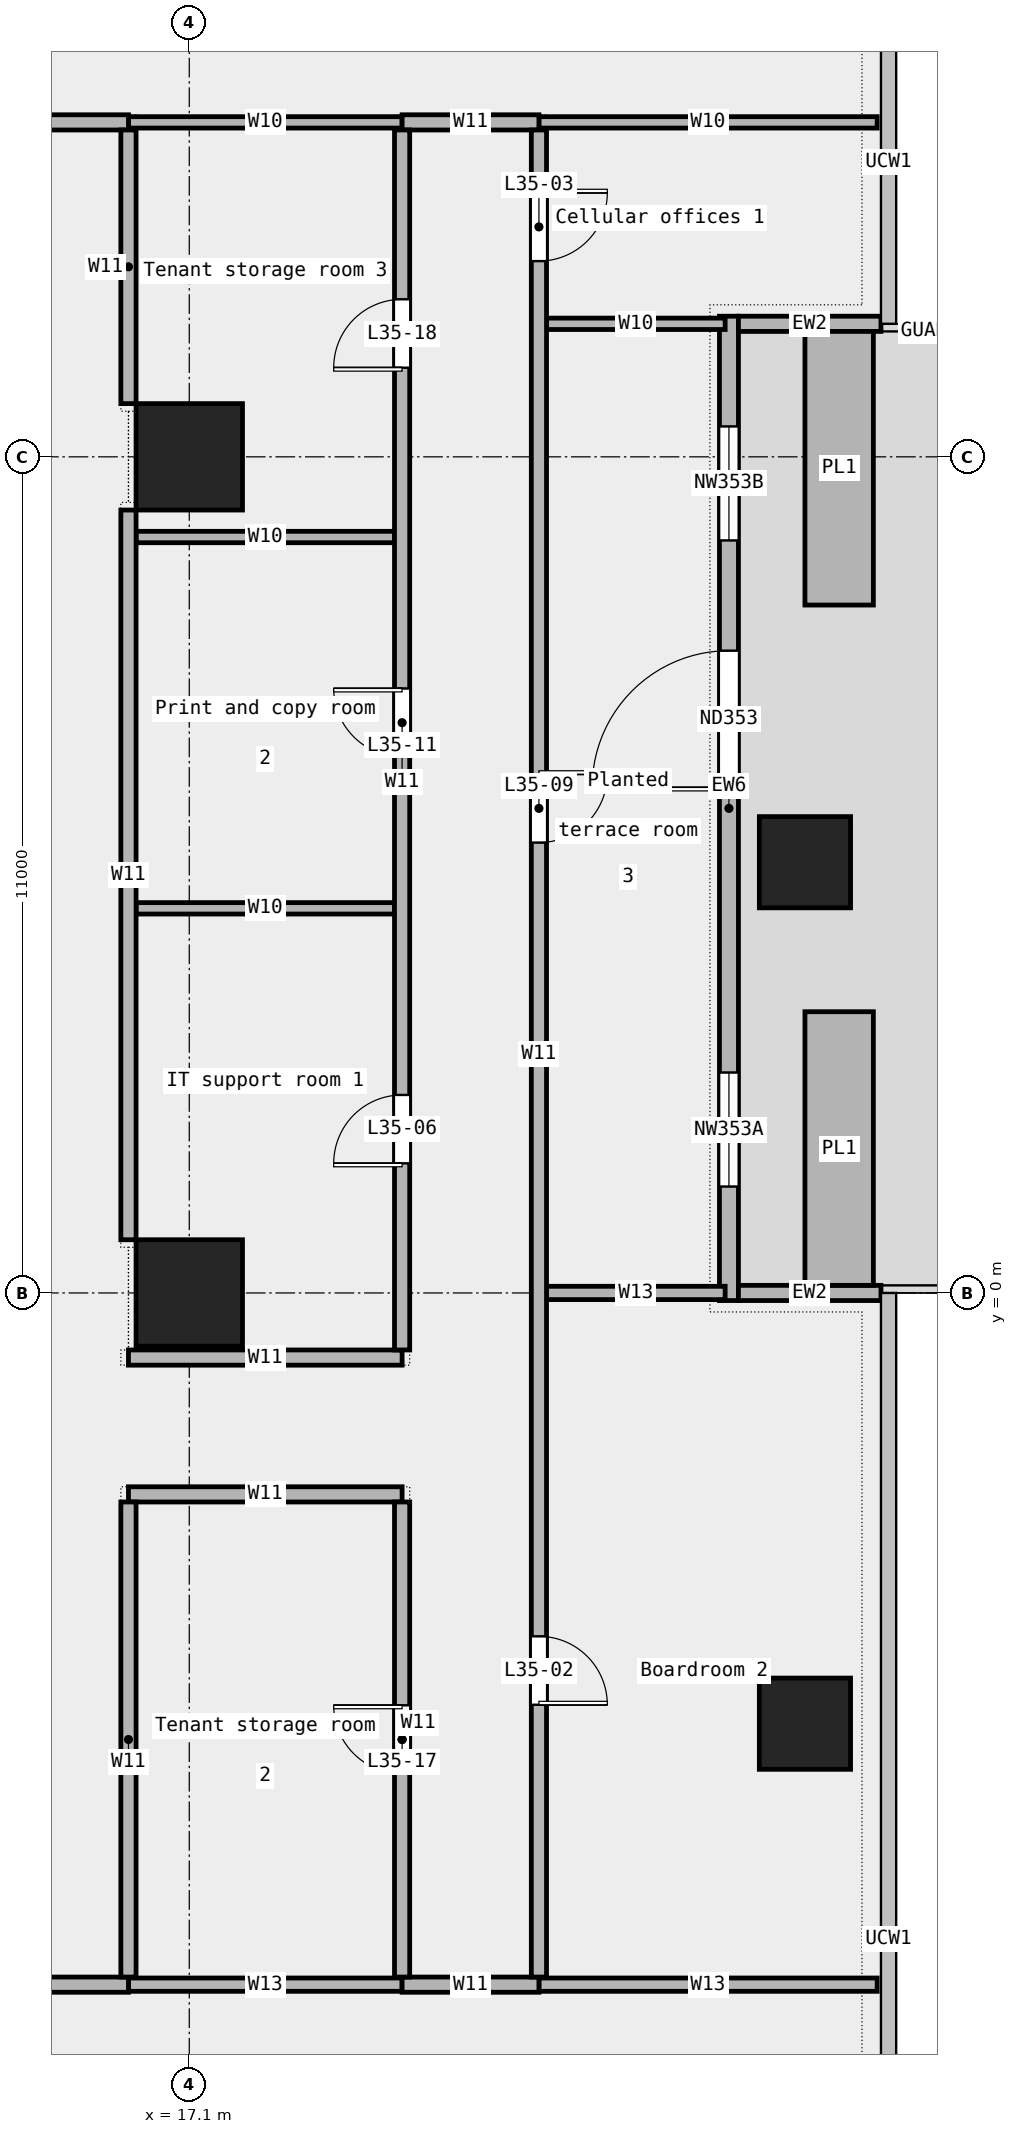
"""IFC4 building model, lengths in metres.
Left out: names, types, materials, properties, quantities, classifications, styles, units other than length and angle.
Written with IfcOpenShell. Run it as: python <this file> out.ifc"""

import sys

from ifc_helpers import new_model, si_unit, direction, frame, frame_2d, origin, origin_2d, place, context, subcontext, project, spatial, rectangle, extrude, element, fill, save


model = new_model("IFC4")
c1 = context("Model", 3, precision=1e-05, world=origin(), true_north=direction((0.0, 1.0)))
c2 = subcontext(c1, "Body", "Model", "MODEL_VIEW")
j1 = project(units=[si_unit("LENGTHUNIT", "METRE"), si_unit("PLANEANGLEUNIT", "RADIAN")], contexts=[c1])
p1 = place(None, origin())
s1 = spatial("IfcSite", under=j1, at=p1, CompositionType="ELEMENT")
p2 = place(p1, origin())
s2 = spatial("IfcBuilding", under=s1, at=p2, CompositionType="ELEMENT")
p3 = place(p2, frame((0.0, 0.0, 173.0)))
s3 = spatial("IfcBuildingStorey", under=s2, at=p3, CompositionType="ELEMENT", Elevation=173.0)
for number, where, z_axis, x_axis in (
    (1, (25.2, -5.667, 0.0), (0.0, 0.0, 1.0), (1.0, 0.0, 0.0)),
    (2, (25.2, 5.667, 0.0), (0.0, 0.0, 1.0), (1.0, 0.0, 0.0)),
):
    element("IfcColumn", number, at=place(p3, frame(where, z_axis=z_axis, x_axis=x_axis)), inside=s3, PredefinedType="COLUMN", context=c2, shape_type="SweptSolid", body=[
        extrude(rectangle(XDim=1.2, YDim=1.2, at=origin_2d()), origin(), (0.0, 0.0, 1.0), 3.6),
    ])
for number, where, z_axis, x_axis in (
    (3, (17.1, 0.0, 0.0), (0.0, 0.0, 1.0), (1.0, 0.0, 0.0)),
    (4, (17.1, 11.0, 0.0), (0.0, 0.0, 1.0), (1.0, 0.0, 0.0)),
):
    element("IfcColumn", number, at=place(p3, frame(where, z_axis=z_axis, x_axis=x_axis)), inside=s3, PredefinedType="COLUMN", context=c2, shape_type="SweptSolid", body=[
        extrude(rectangle(XDim=1.4, YDim=1.4, at=origin_2d()), origin(), (0.0, 0.0, 1.0), 3.6),
    ])
p4 = place(p3, frame((24.2, -0.1, 0.0), z_axis=(0.0, 0.0, 1.0), x_axis=(0.0, 1.0, 0.0)))
e5 = element("IfcWall", 5, at=p4, inside=s3, PredefinedType="STANDARD", context=c2, shape_type="SweptSolid", body=[
    extrude(rectangle(XDim=12.95, YDim=0.25, at=frame_2d((6.475, 0.0))), origin(), (0.0, 0.0, 1.0), 3.6),
])
p5 = place(p4, frame((1.5, 0.0, 0.45)))
e6 = element("IfcOpeningElement", 6, at=p5, cuts=e5, PredefinedType="OPENING", context=c2, shape_type="SweptSolid", body=[
    extrude(rectangle(XDim=1.5, YDim=2.4, at=frame_2d((0.75, 1.2))), frame((0.0, 0.137, 0.0), z_axis=(0.0, -1.0, 0.0), x_axis=(1.0, 0.0, 0.0)), (0.0, 0.0, 1.0), 0.274),
])
p6 = place(p4, frame((6.75, 0.0, 0.0)))
e7 = element("IfcOpeningElement", 7, at=p6, cuts=e5, PredefinedType="OPENING", context=c2, shape_type="SweptSolid", body=[
    extrude(rectangle(XDim=1.8, YDim=2.4, at=frame_2d((0.9, 1.2))), frame((0.0, 0.137, 0.0), z_axis=(0.0, -1.0, 0.0), x_axis=(1.0, 0.0, 0.0)), (0.0, 0.0, 1.0), 0.274),
])
p7 = place(p4, frame((10.0, 0.0, 0.45)))
e8 = element("IfcOpeningElement", 8, at=p7, cuts=e5, PredefinedType="OPENING", context=c2, shape_type="SweptSolid", body=[
    extrude(rectangle(XDim=1.5, YDim=2.4, at=frame_2d((0.75, 1.2))), frame((0.0, 0.137, 0.0), z_axis=(0.0, -1.0, 0.0), x_axis=(1.0, 0.0, 0.0)), (0.0, 0.0, 1.0), 0.274),
])
for number, where, z_axis, x_axis in (
    (9, (26.2, 0.0, 0.0), (0.0, 0.0, 1.0), (-1.0, 0.0, 0.0)),
    (10, (26.2, 12.75, 0.0), (0.0, 0.0, 1.0), (-1.0, 0.0, 0.0)),
):
    element("IfcWall", number, at=place(p3, frame(where, z_axis=z_axis, x_axis=x_axis)), inside=s3, PredefinedType="STANDARD", context=c2, shape_type="SweptSolid", body=[
        extrude(rectangle(XDim=1.875, YDim=0.2, at=frame_2d((0.938, 0.0))), origin(), (0.0, 0.0, 1.0), 3.6),
    ])
for number, where, z_axis, x_axis in (
    (11, (25.65, 0.1, 0.0), (0.0, 0.0, 1.0), (0.0, 1.0, 0.0)),
    (12, (25.65, 9.05, 0.0), (0.0, 0.0, 1.0), (0.0, 1.0, 0.0)),
):
    element("IfcWall", number, at=place(p3, frame(where, z_axis=z_axis, x_axis=x_axis)), inside=s3, PredefinedType="STANDARD", context=c2, shape_type="SweptSolid", body=[
        extrude(rectangle(XDim=3.6, YDim=0.9, at=frame_2d((1.8, 0.0))), origin(), (0.0, 0.0, 1.0), 0.7),
    ])
p8 = place(p3, frame((16.3, -9.1, 0.0), z_axis=(0.0, 0.0, 1.0), x_axis=(1.0, 0.0, 0.0)))
e13 = element("IfcWall", 13, at=p8, inside=s3, PredefinedType="PARTITIONING", context=c2, shape_type="SweptSolid", body=[
    extrude(rectangle(XDim=3.6, YDim=0.175, at=frame_2d((1.8, 0.0))), origin(), (0.0, 0.0, 1.0), 3.6),
])
p9 = place(p3, frame((21.7, -9.1, 0.0), z_axis=(0.0, 0.0, 1.0), x_axis=(1.0, 0.0, 0.0)))
e14 = element("IfcWall", 14, at=p9, inside=s3, PredefinedType="PARTITIONING", context=c2, shape_type="SweptSolid", body=[
    extrude(rectangle(XDim=4.45, YDim=0.175, at=frame_2d((2.225, 0.0))), origin(), (0.0, 0.0, 1.0), 3.6),
])
p10 = place(p3, frame((-3.04, -9.1, 0.0), z_axis=(0.0, 0.0, 1.0), x_axis=(1.0, 0.0, 0.0)))
e15 = element("IfcWall", 15, at=p10, inside=s3, PredefinedType="PARTITIONING", context=c2, shape_type="SweptSolid", body=[
    extrude(rectangle(XDim=19.34, YDim=0.2, at=frame_2d((9.67, 0.0))), origin(), (0.0, 0.0, 1.0), 3.6),
])
p11 = place(p10, frame((5.942, 0.0, 0.0)))
e16 = element("IfcOpeningElement", 16, at=p11, cuts=e15, PredefinedType="OPENING", context=c2, shape_type="SweptSolid", body=[
    extrude(rectangle(XDim=1.0, YDim=2.1, at=frame_2d((0.5, 1.05))), frame((0.0, 0.112, 0.0), z_axis=(0.0, -1.0, 0.0), x_axis=(1.0, 0.0, 0.0)), (0.0, 0.0, 1.0), 0.224),
])
p12 = place(p3, frame((19.9, -9.1, 0.0), z_axis=(0.0, 0.0, 1.0), x_axis=(1.0, 0.0, 0.0)))
e17 = element("IfcWall", 17, at=p12, inside=s3, PredefinedType="PARTITIONING", context=c2, shape_type="SweptSolid", body=[
    extrude(rectangle(XDim=1.8, YDim=0.2, at=frame_2d((0.9, 0.0))), origin(), (0.0, 0.0, 1.0), 3.6),
])
for number, where, z_axis, x_axis in (
    (18, (16.3, -2.65, 0.0), (0.0, 0.0, 1.0), (1.0, 0.0, 0.0)),
    (19, (16.3, -0.85, 0.0), (0.0, 0.0, 1.0), (1.0, 0.0, 0.0)),
):
    element("IfcWall", number, at=place(p3, frame(where, z_axis=z_axis, x_axis=x_axis)), inside=s3, PredefinedType="PARTITIONING", context=c2, shape_type="SweptSolid", body=[
        extrude(rectangle(XDim=3.6, YDim=0.2, at=frame_2d((1.8, 0.0))), origin(), (0.0, 0.0, 1.0), 3.6),
    ])
p13 = place(p3, frame((21.8, 0.0, 0.0), z_axis=(0.0, 0.0, 1.0), x_axis=(1.0, 0.0, 0.0)))
e20 = element("IfcWall", 20, at=p13, inside=s3, PredefinedType="PARTITIONING", context=c2, shape_type="SweptSolid", body=[
    extrude(rectangle(XDim=2.35, YDim=0.175, at=frame_2d((1.175, 0.0))), origin(), (0.0, 0.0, 1.0), 3.6),
])
for number, where, z_axis, x_axis in (
    (21, (16.4, 5.06, 0.0), (0.0, 0.0, 1.0), (1.0, 0.0, 0.0)),
    (22, (16.4, 9.945, 0.0), (0.0, 0.0, 1.0), (1.0, 0.0, 0.0)),
):
    element("IfcWall", number, at=place(p3, frame(where, z_axis=z_axis, x_axis=x_axis)), inside=s3, PredefinedType="PARTITIONING", context=c2, shape_type="SweptSolid", body=[
        extrude(rectangle(XDim=3.4, YDim=0.15, at=frame_2d((1.7, 0.0))), origin(), (0.0, 0.0, 1.0), 3.6),
    ])
p14 = place(p3, frame((21.8, 12.75, 0.0), z_axis=(0.0, 0.0, 1.0), x_axis=(1.0, 0.0, 0.0)))
e23 = element("IfcWall", 23, at=p14, inside=s3, PredefinedType="PARTITIONING", context=c2, shape_type="SweptSolid", body=[
    extrude(rectangle(XDim=2.35, YDim=0.15, at=frame_2d((1.175, 0.0))), origin(), (0.0, 0.0, 1.0), 3.6),
])
p15 = place(p3, frame((16.3, 15.4, 0.0), z_axis=(0.0, 0.0, 1.0), x_axis=(1.0, 0.0, 0.0)))
e24 = element("IfcWall", 24, at=p15, inside=s3, PredefinedType="PARTITIONING", context=c2, shape_type="SweptSolid", body=[
    extrude(rectangle(XDim=3.6, YDim=0.15, at=frame_2d((1.8, 0.0))), origin(), (0.0, 0.0, 1.0), 3.6),
])
p16 = place(p3, frame((21.7, 15.4, 0.0), z_axis=(0.0, 0.0, 1.0), x_axis=(1.0, 0.0, 0.0)))
e25 = element("IfcWall", 25, at=p16, inside=s3, PredefinedType="PARTITIONING", context=c2, shape_type="SweptSolid", body=[
    extrude(rectangle(XDim=4.45, YDim=0.15, at=frame_2d((2.225, 0.0))), origin(), (0.0, 0.0, 1.0), 3.6),
])
p17 = place(p3, frame((-16.3, 15.4, 0.0), z_axis=(0.0, 0.0, 1.0), x_axis=(1.0, 0.0, 0.0)))
e26 = element("IfcWall", 26, at=p17, inside=s3, PredefinedType="PARTITIONING", context=c2, shape_type="SweptSolid", body=[
    extrude(rectangle(XDim=32.6, YDim=0.2, at=frame_2d((16.3, 0.0))), origin(), (0.0, 0.0, 1.0), 3.6),
])
p18 = place(p17, frame((24.415, 0.0, 0.0)))
e27 = element("IfcOpeningElement", 27, at=p18, cuts=e26, PredefinedType="OPENING", context=c2, shape_type="SweptSolid", body=[
    extrude(rectangle(XDim=1.8, YDim=2.1, at=frame_2d((0.9, 1.05))), frame((0.0, 0.112, 0.0), z_axis=(0.0, -1.0, 0.0), x_axis=(1.0, 0.0, 0.0)), (0.0, 0.0, 1.0), 0.224),
])
p19 = place(p17, frame((12.24, 0.0, 0.0)))
e28 = element("IfcOpeningElement", 28, at=p19, cuts=e26, PredefinedType="OPENING", context=c2, shape_type="SweptSolid", body=[
    extrude(rectangle(XDim=1.2, YDim=2.1, at=frame_2d((0.6, 1.05))), frame((0.0, 0.112, 0.0), z_axis=(0.0, -1.0, 0.0), x_axis=(1.0, 0.0, 0.0)), (0.0, 0.0, 1.0), 0.224),
])
p20 = place(p17, frame((3.075, 0.0, 0.0)))
e29 = element("IfcOpeningElement", 29, at=p20, cuts=e26, PredefinedType="OPENING", context=c2, shape_type="SweptSolid", body=[
    extrude(rectangle(XDim=1.5, YDim=2.1, at=frame_2d((0.75, 1.05))), frame((0.0, 0.112, 0.0), z_axis=(0.0, -1.0, 0.0), x_axis=(1.0, 0.0, 0.0)), (0.0, 0.0, 1.0), 0.224),
])
p21 = place(p3, frame((19.9, 15.4, 0.0), z_axis=(0.0, 0.0, 1.0), x_axis=(1.0, 0.0, 0.0)))
e30 = element("IfcWall", 30, at=p21, inside=s3, PredefinedType="PARTITIONING", context=c2, shape_type="SweptSolid", body=[
    extrude(rectangle(XDim=1.8, YDim=0.2, at=frame_2d((0.9, 0.0))), origin(), (0.0, 0.0, 1.0), 3.6),
])
p22 = place(p3, frame((16.3, -9.0, 0.0), z_axis=(0.0, 0.0, 1.0), x_axis=(0.0, 1.0, 0.0)))
e31 = element("IfcWall", 31, at=p22, inside=s3, PredefinedType="PARTITIONING", context=c2, shape_type="SweptSolid", body=[
    extrude(rectangle(XDim=6.25, YDim=0.2, at=frame_2d((3.125, 0.0))), origin(), (0.0, 0.0, 1.0), 3.6),
])
p23 = place(p3, frame((16.3, 0.7, 0.0), z_axis=(0.0, 0.0, 1.0), x_axis=(0.0, 1.0, 0.0)))
e32 = element("IfcWall", 32, at=p23, inside=s3, PredefinedType="PARTITIONING", context=c2, shape_type="SweptSolid", body=[
    extrude(rectangle(XDim=9.6, YDim=0.2, at=frame_2d((4.8, 0.0))), origin(), (0.0, 0.0, 1.0), 3.6),
])
p24 = place(p3, frame((16.3, 11.7, 0.0), z_axis=(0.0, 0.0, 1.0), x_axis=(0.0, 1.0, 0.0)))
e33 = element("IfcWall", 33, at=p24, inside=s3, PredefinedType="PARTITIONING", context=c2, shape_type="SweptSolid", body=[
    extrude(rectangle(XDim=3.6, YDim=0.2, at=frame_2d((1.8, 0.0))), origin(), (0.0, 0.0, 1.0), 3.6),
])
p25 = place(p3, frame((19.9, -9.0, 0.0), z_axis=(0.0, 0.0, 1.0), x_axis=(0.0, 1.0, 0.0)))
e34 = element("IfcWall", 34, at=p25, inside=s3, PredefinedType="PARTITIONING", context=c2, shape_type="SweptSolid", body=[
    extrude(rectangle(XDim=6.25, YDim=0.2, at=frame_2d((3.125, 0.0))), origin(), (0.0, 0.0, 1.0), 3.6),
])
p26 = place(p25, frame((2.675, 0.0, 0.0)))
e35 = element("IfcOpeningElement", 35, at=p26, cuts=e34, PredefinedType="OPENING", context=c2, shape_type="SweptSolid", body=[
    extrude(rectangle(XDim=0.9, YDim=2.1, at=frame_2d((0.45, 1.05))), frame((0.0, 0.112, 0.0), z_axis=(0.0, -1.0, 0.0), x_axis=(1.0, 0.0, 0.0)), (0.0, 0.0, 1.0), 0.224),
])
p27 = place(p3, frame((19.9, -0.75, 0.0), z_axis=(0.0, 0.0, 1.0), x_axis=(0.0, 1.0, 0.0)))
e36 = element("IfcWall", 36, at=p27, inside=s3, PredefinedType="PARTITIONING", context=c2, shape_type="SweptSolid", body=[
    extrude(rectangle(XDim=16.05, YDim=0.2, at=frame_2d((8.025, 0.0))), origin(), (0.0, 0.0, 1.0), 3.6),
])
p28 = place(p27, frame((2.455, 0.0, 0.0)))
e37 = element("IfcOpeningElement", 37, at=p28, cuts=e36, PredefinedType="OPENING", context=c2, shape_type="SweptSolid", body=[
    extrude(rectangle(XDim=0.9, YDim=2.1, at=frame_2d((0.45, 1.05))), frame((0.0, 0.112, 0.0), z_axis=(0.0, -1.0, 0.0), x_axis=(1.0, 0.0, 0.0)), (0.0, 0.0, 1.0), 0.224),
])
p29 = place(p27, frame((7.802, 0.0, 0.0)))
e38 = element("IfcOpeningElement", 38, at=p29, cuts=e36, PredefinedType="OPENING", context=c2, shape_type="SweptSolid", body=[
    extrude(rectangle(XDim=0.9, YDim=2.1, at=frame_2d((0.45, 1.05))), frame((0.0, 0.112, 0.0), z_axis=(0.0, -1.0, 0.0), x_axis=(1.0, 0.0, 0.0)), (0.0, 0.0, 1.0), 0.224),
])
p30 = place(p27, frame((12.923, 0.0, 0.0)))
e39 = element("IfcOpeningElement", 39, at=p30, cuts=e36, PredefinedType="OPENING", context=c2, shape_type="SweptSolid", body=[
    extrude(rectangle(XDim=0.9, YDim=2.1, at=frame_2d((0.45, 1.05))), frame((0.0, 0.112, 0.0), z_axis=(0.0, -1.0, 0.0), x_axis=(1.0, 0.0, 0.0)), (0.0, 0.0, 1.0), 0.224),
])
p31 = place(p3, frame((21.7, -9.0, 0.0), z_axis=(0.0, 0.0, 1.0), x_axis=(0.0, 1.0, 0.0)))
e40 = element("IfcWall", 40, at=p31, inside=s3, PredefinedType="PARTITIONING", context=c2, shape_type="SweptSolid", body=[
    extrude(rectangle(XDim=24.3, YDim=0.2, at=frame_2d((12.15, 0.0))), origin(), (0.0, 0.0, 1.0), 3.6),
])
p32 = place(p31, frame((3.583, 0.0, 0.0)))
e41 = element("IfcOpeningElement", 41, at=p32, cuts=e40, PredefinedType="OPENING", context=c2, shape_type="SweptSolid", body=[
    extrude(rectangle(XDim=0.9, YDim=2.1, at=frame_2d((0.45, 1.05))), frame((0.0, 0.112, 0.0), z_axis=(0.0, -1.0, 0.0), x_axis=(1.0, 0.0, 0.0)), (0.0, 0.0, 1.0), 0.224),
])
p33 = place(p31, frame((22.575, 0.0, 0.0)))
e42 = element("IfcOpeningElement", 42, at=p33, cuts=e40, PredefinedType="OPENING", context=c2, shape_type="SweptSolid", body=[
    extrude(rectangle(XDim=0.9, YDim=2.1, at=frame_2d((0.45, 1.05))), frame((0.0, 0.112, 0.0), z_axis=(0.0, -1.0, 0.0), x_axis=(1.0, 0.0, 0.0)), (0.0, 0.0, 1.0), 0.224),
])
p34 = place(p31, frame((14.925, 0.0, 0.0)))
e43 = element("IfcOpeningElement", 43, at=p34, cuts=e40, PredefinedType="OPENING", context=c2, shape_type="SweptSolid", body=[
    extrude(rectangle(XDim=0.9, YDim=2.1, at=frame_2d((0.45, 1.05))), frame((0.0, 0.112, 0.0), z_axis=(0.0, -1.0, 0.0), x_axis=(1.0, 0.0, 0.0)), (0.0, 0.0, 1.0), 0.224),
])
p35 = place(p5, origin())
e44 = element("IfcWindow", 44, at=p35, inside=s3, PartitioningType="SINGLE_PANEL", PredefinedType="WINDOW", context=c2, shape_type="SweptSolid", body=[
    extrude(rectangle(XDim=1.5, YDim=2.4, at=frame_2d((0.75, 1.2))), frame((0.0, 0.03, 0.0), z_axis=(0.0, -1.0, 0.0), x_axis=(1.0, 0.0, 0.0)), (0.0, 0.0, 1.0), 0.06),
])
fill(e6, e44)
p36 = place(p6, origin())
e45 = element("IfcDoor", 45, at=p36, inside=s3, OperationType="DOUBLE_DOOR_SINGLE_SWING", PredefinedType="DOOR", context=c2, shape_type="SweptSolid", body=[
    extrude(rectangle(XDim=1.8, YDim=2.4, at=frame_2d((0.9, 1.2))), frame((0.0, 0.025, 0.0), z_axis=(0.0, -1.0, 0.0), x_axis=(1.0, 0.0, 0.0)), (0.0, 0.0, 1.0), 0.05),
])
fill(e7, e45)
p37 = place(p7, origin())
e46 = element("IfcWindow", 46, at=p37, inside=s3, PartitioningType="SINGLE_PANEL", PredefinedType="WINDOW", context=c2, shape_type="SweptSolid", body=[
    extrude(rectangle(XDim=1.5, YDim=2.4, at=frame_2d((0.75, 1.2))), frame((0.0, 0.03, 0.0), z_axis=(0.0, -1.0, 0.0), x_axis=(1.0, 0.0, 0.0)), (0.0, 0.0, 1.0), 0.06),
])
fill(e8, e46)
p38 = place(p32, origin())
e47 = element("IfcDoor", 47, at=p38, inside=s3, OperationType="SINGLE_SWING_RIGHT", PredefinedType="DOOR", context=c2, shape_type="SweptSolid", body=[
    extrude(rectangle(XDim=0.9, YDim=2.1, at=frame_2d((0.45, 1.05))), frame((0.0, 0.025, 0.0), z_axis=(0.0, -1.0, 0.0), x_axis=(1.0, 0.0, 0.0)), (0.0, 0.0, 1.0), 0.05),
])
fill(e41, e47)
p39 = place(p33, origin())
e48 = element("IfcDoor", 48, at=p39, inside=s3, OperationType="SINGLE_SWING_LEFT", PredefinedType="DOOR", context=c2, shape_type="SweptSolid", body=[
    extrude(rectangle(XDim=0.9, YDim=2.1, at=frame_2d((0.45, 1.05))), frame((0.0, 0.025, 0.0), z_axis=(0.0, -1.0, 0.0), x_axis=(1.0, 0.0, 0.0)), (0.0, 0.0, 1.0), 0.05),
])
fill(e42, e48)
p40 = place(p28, origin())
e49 = element("IfcDoor", 49, at=p40, inside=s3, OperationType="SINGLE_SWING_LEFT", PredefinedType="DOOR", context=c2, shape_type="SweptSolid", body=[
    extrude(rectangle(XDim=0.9, YDim=2.1, at=frame_2d((0.45, 1.05))), frame((0.0, 0.025, 0.0), z_axis=(0.0, -1.0, 0.0), x_axis=(1.0, 0.0, 0.0)), (0.0, 0.0, 1.0), 0.05),
])
fill(e37, e49)
p41 = place(p34, origin())
e50 = element("IfcDoor", 50, at=p41, inside=s3, OperationType="SINGLE_SWING_LEFT", PredefinedType="DOOR", context=c2, shape_type="SweptSolid", body=[
    extrude(rectangle(XDim=0.9, YDim=2.1, at=frame_2d((0.45, 1.05))), frame((0.0, 0.025, 0.0), z_axis=(0.0, -1.0, 0.0), x_axis=(1.0, 0.0, 0.0)), (0.0, 0.0, 1.0), 0.05),
])
fill(e43, e50)
p42 = place(p29, origin())
e51 = element("IfcDoor", 51, at=p42, inside=s3, OperationType="SINGLE_SWING_RIGHT", PredefinedType="DOOR", context=c2, shape_type="SweptSolid", body=[
    extrude(rectangle(XDim=0.9, YDim=2.1, at=frame_2d((0.45, 1.05))), frame((0.0, 0.025, 0.0), z_axis=(0.0, -1.0, 0.0), x_axis=(1.0, 0.0, 0.0)), (0.0, 0.0, 1.0), 0.05),
])
fill(e38, e51)
p43 = place(p26, origin())
e52 = element("IfcDoor", 52, at=p43, inside=s3, OperationType="SINGLE_SWING_RIGHT", PredefinedType="DOOR", context=c2, shape_type="SweptSolid", body=[
    extrude(rectangle(XDim=0.9, YDim=2.1, at=frame_2d((0.45, 1.05))), frame((0.0, 0.025, 0.0), z_axis=(0.0, -1.0, 0.0), x_axis=(1.0, 0.0, 0.0)), (0.0, 0.0, 1.0), 0.05),
])
fill(e35, e52)
p44 = place(p30, origin())
e53 = element("IfcDoor", 53, at=p44, inside=s3, OperationType="SINGLE_SWING_LEFT", PredefinedType="DOOR", context=c2, shape_type="SweptSolid", body=[
    extrude(rectangle(XDim=0.9, YDim=2.1, at=frame_2d((0.45, 1.05))), frame((0.0, 0.025, 0.0), z_axis=(0.0, -1.0, 0.0), x_axis=(1.0, 0.0, 0.0)), (0.0, 0.0, 1.0), 0.05),
])
fill(e39, e53)
save(model, sys.argv[1])
